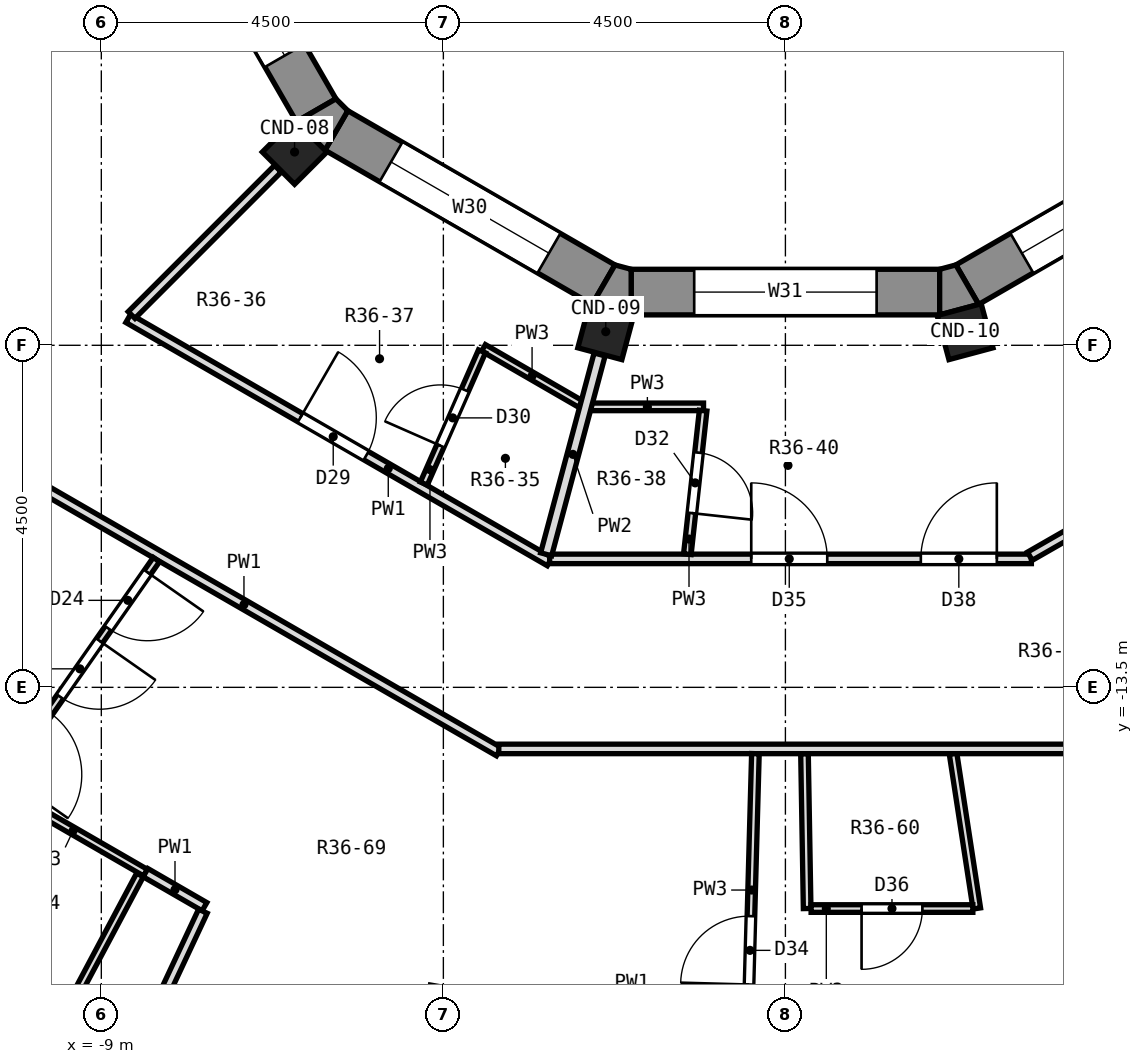
"""IFC4 building model, lengths in metres.
Left out: names, types, materials, properties, quantities, classifications, styles, units other than length and angle.
Written with IfcOpenShell. Run it as: python <this file> out.ifc"""

import sys

from ifc_helpers import new_model, si_unit, direction, frame, frame_2d, origin, origin_2d, place, context, subcontext, project, spatial, polyline, rectangle, outline, extrude, element, fill, save


model = new_model("IFC4")
c1 = context("Model", 3, precision=1e-05, world=origin(), true_north=direction((0.0, 1.0)))
c2 = subcontext(c1, "Body", "Model", "MODEL_VIEW")
j1 = project(units=[si_unit("LENGTHUNIT", "METRE"), si_unit("PLANEANGLEUNIT", "RADIAN")], contexts=[c1])
p1 = place(None, origin())
s1 = spatial("IfcSite", under=j1, at=p1, CompositionType="ELEMENT")
p2 = place(p1, origin())
s2 = spatial("IfcBuilding", under=s1, at=p2, CompositionType="ELEMENT")
p3 = place(p2, frame((0.0, 0.0, 259.4)))
s3 = spatial("IfcBuildingStorey", under=s2, at=p3, CompositionType="ELEMENT", Elevation=259.4)
for number, where, z_axis, x_axis in (
    (1, (-6.458, -6.458, 0.0), (0.0, 0.0, 1.0), (-0.707, -0.707, 0.0)),
    (2, (-2.364, -8.821, 0.0), (0.0, 0.0, 1.0), (-0.259, -0.966, 0.0)),
    (3, (2.364, -8.821, 0.0), (0.0, 0.0, 1.0), (0.259, -0.966, 0.0)),
):
    element("IfcColumn", number, at=place(p3, frame(where, z_axis=z_axis, x_axis=x_axis)), inside=s3, PredefinedType="COLUMN", context=c2, shape_type="SweptSolid", body=[
        extrude(rectangle(XDim=0.6, YDim=0.6, at=origin_2d()), origin(), (0.0, 0.0, 1.0), 3.3),
    ])
p4 = place(p3, frame((-8.203, -2.393, 0.0), z_axis=(0.0, 0.0, 1.0), x_axis=(0.499994954979, -0.866028316509, 0.0)))
e4 = element("IfcWall", 4, at=p4, inside=s3, PredefinedType="SOLIDWALL", context=c2, shape_type="SweptSolid", body=[
    extrude(rectangle(XDim=4.059, YDim=0.6, at=frame_2d((2.029, 0.0))), origin(), (0.0, 0.0, 1.0), 2.9),
])
p5 = place(p4, frame((0.829, 0.0, 0.9)))
e5 = element("IfcOpeningElement", 5, at=p5, cuts=e4, PredefinedType="OPENING", context=c2, shape_type="SweptSolid", body=[
    extrude(rectangle(XDim=2.4, YDim=1.8, at=frame_2d((1.2, 0.9))), frame((0.0, 0.312, 0.0), z_axis=(0.0, -1.0, 0.0), x_axis=(1.0, 0.0, 0.0)), (0.0, 0.0, 1.0), 0.624),
])
p6 = place(p3, frame((-5.907, -6.173, 0.0), z_axis=(0.0, 0.0, 1.0), x_axis=(0.866028316509, -0.499994954979, 0.0)))
e6 = element("IfcWall", 6, at=p6, inside=s3, PredefinedType="SOLIDWALL", context=c2, shape_type="SweptSolid", body=[
    extrude(rectangle(XDim=4.059, YDim=0.6, at=frame_2d((2.029, 0.0))), origin(), (0.0, 0.0, 1.0), 2.9),
])
p7 = place(p6, frame((0.829, 0.0, 0.9)))
e7 = element("IfcOpeningElement", 7, at=p7, cuts=e6, PredefinedType="OPENING", context=c2, shape_type="SweptSolid", body=[
    extrude(rectangle(XDim=2.4, YDim=1.8, at=frame_2d((1.2, 0.9))), frame((0.0, 0.312, 0.0), z_axis=(0.0, -1.0, 0.0), x_axis=(1.0, 0.0, 0.0)), (0.0, 0.0, 1.0), 0.624),
])
p8 = place(p3, frame((-2.029, -8.3, 0.0), z_axis=(0.0, 0.0, 1.0), x_axis=(1.0, 0.0, 0.0)))
e8 = element("IfcWall", 8, at=p8, inside=s3, PredefinedType="SOLIDWALL", context=c2, shape_type="SweptSolid", body=[
    extrude(rectangle(XDim=4.059, YDim=0.6, at=frame_2d((2.029, 0.0))), origin(), (0.0, 0.0, 1.0), 2.9),
])
p9 = place(p8, frame((0.829, 0.0, 0.9)))
e9 = element("IfcOpeningElement", 9, at=p9, cuts=e8, PredefinedType="OPENING", context=c2, shape_type="SweptSolid", body=[
    extrude(rectangle(XDim=2.4, YDim=1.8, at=frame_2d((1.2, 0.9))), frame((0.0, 0.312, 0.0), z_axis=(0.0, -1.0, 0.0), x_axis=(1.0, 0.0, 0.0)), (0.0, 0.0, 1.0), 0.624),
])
p10 = place(p3, frame((2.393, -8.203, 0.0), z_axis=(0.0, 0.0, 1.0), x_axis=(0.866028316509, 0.499994954979, 0.0)))
e10 = element("IfcWall", 10, at=p10, inside=s3, PredefinedType="SOLIDWALL", context=c2, shape_type="SweptSolid", body=[
    extrude(rectangle(XDim=4.059, YDim=0.6, at=frame_2d((2.029, 0.0))), origin(), (0.0, 0.0, 1.0), 2.9),
])
p11 = place(p10, frame((0.829, 0.0, 0.9)))
e11 = element("IfcOpeningElement", 11, at=p11, cuts=e10, PredefinedType="OPENING", context=c2, shape_type="SweptSolid", body=[
    extrude(rectangle(XDim=2.4, YDim=1.8, at=frame_2d((1.2, 0.9))), frame((0.0, 0.312, 0.0), z_axis=(0.0, -1.0, 0.0), x_axis=(1.0, 0.0, 0.0)), (0.0, 0.0, 1.0), 0.624),
])
p12 = place(p3, origin())
e12 = element("IfcWall", 12, at=p12, inside=s3, PredefinedType="SOLIDWALL", context=c2, shape_type="SweptSolid", body=[
    extrude(outline(polyline([(-6.058, -6.433), (-5.758, -5.914), (-5.914, -5.758), (-6.433, -6.058), (-6.058, -6.433)])), origin(), (0.0, 0.0, 1.0), 2.9),
])
p13 = place(p3, origin())
e13 = element("IfcWall", 13, at=p13, inside=s3, PredefinedType="SOLIDWALL", context=c2, shape_type="SweptSolid", body=[
    extrude(outline(polyline([(-2.029, -8.6), (-2.029, -8.0), (-2.242, -7.943), (-2.542, -8.462), (-2.029, -8.6)])), origin(), (0.0, 0.0, 1.0), 2.9),
])
p14 = place(p3, origin())
e14 = element("IfcWall", 14, at=p14, inside=s3, PredefinedType="SOLIDWALL", context=c2, shape_type="SweptSolid", body=[
    extrude(outline(polyline([(2.542, -8.462), (2.242, -7.943), (2.029, -8.0), (2.029, -8.6), (2.542, -8.462)])), origin(), (0.0, 0.0, 1.0), 2.9),
])
p15 = place(p3, frame((0.251, -14.373, 0.0), z_axis=(0.0, 0.0, 1.0), x_axis=(0.017133494207, -0.999853210915, 0.0)))
e15 = element("IfcWall", 15, at=p15, inside=s3, PredefinedType="PARTITIONING", context=c2, shape_type="SweptSolid", body=[
    extrude(rectangle(XDim=2.038, YDim=0.1, at=frame_2d((1.019, 0.0))), origin(), (0.0, 0.0, 1.0), 2.9),
])
p16 = place(p3, frame((2.206, -14.372, 0.0), z_axis=(0.0, 0.0, 1.0), x_axis=(0.151514148926, -0.988455088851, 0.0)))
e16 = element("IfcWall", 16, at=p16, inside=s3, PredefinedType="PARTITIONING", context=c2, shape_type="SweptSolid", body=[
    extrude(rectangle(XDim=2.061, YDim=0.1, at=frame_2d((1.03, 0.0))), origin(), (0.0, 0.0, 1.0), 2.9),
])
p17 = place(p3, frame((-11.639, -16.735, 0.0), z_axis=(0.0, 0.0, 1.0), x_axis=(0.866093196455, -0.499882561262, 0.0)))
e17 = element("IfcWall", 17, at=p17, inside=s3, PredefinedType="PARTITIONING", context=c2, shape_type="SweptSolid", body=[
    extrude(rectangle(XDim=2.42, YDim=0.1, at=frame_2d((1.21, 0.0))), origin(), (0.0, 0.0, 1.0), 2.9),
])
p18 = place(p17, frame((0.778, 0.0, 0.0)))
e18 = element("IfcOpeningElement", 18, at=p18, cuts=e17, PredefinedType="OPENING", context=c2, shape_type="SweptSolid", body=[
    extrude(rectangle(XDim=0.8, YDim=2.1, at=frame_2d((0.4, 1.05))), frame((0.0, 0.062, 0.0), z_axis=(0.0, -1.0, 0.0), x_axis=(1.0, 0.0, 0.0)), (0.0, 0.0, 1.0), 0.124),
])
p19 = place(p3, frame((-10.324, -14.838, 0.0), z_axis=(0.0, 0.0, 1.0), x_axis=(0.866035918664, -0.499981787252, 0.0)))
e19 = element("IfcWall", 19, at=p19, inside=s3, PredefinedType="PARTITIONING", context=c2, shape_type="SweptSolid", body=[
    extrude(rectangle(XDim=2.2, YDim=0.1, at=frame_2d((1.1, 0.0))), origin(), (0.0, 0.0, 1.0), 2.9),
])
p20 = place(p3, frame((-8.419, -15.938, 0.0), z_axis=(0.0, 0.0, 1.0), x_axis=(0.866053945006, -0.499950561895, 0.0)))
e20 = element("IfcWall", 20, at=p20, inside=s3, PredefinedType="PARTITIONING", context=c2, shape_type="SweptSolid", body=[
    extrude(rectangle(XDim=0.896, YDim=0.125, at=frame_2d((0.448, 0.0))), origin(), (0.0, 0.0, 1.0), 2.9),
])
p21 = place(p3, frame((-10.476, -10.476, 0.0), z_axis=(0.0, 0.0, 1.0), x_axis=(0.866073222863, -0.499917165778, 0.0)))
e21 = element("IfcWall", 21, at=p21, inside=s3, PredefinedType="PARTITIONING", context=c2, shape_type="SweptSolid", body=[
    extrude(rectangle(XDim=7.742, YDim=0.125, at=frame_2d((3.871, 0.0))), origin(), (0.0, 0.0, 1.0), 2.9),
])
p22 = place(p3, frame((-8.646, -8.646, 0.0), z_axis=(0.0, 0.0, 1.0), x_axis=(0.866085253322, -0.49989632323, 0.0)))
e22 = element("IfcWall", 22, at=p22, inside=s3, PredefinedType="PARTITIONING", context=c2, shape_type="SweptSolid", body=[
    extrude(rectangle(XDim=6.402, YDim=0.125, at=frame_2d((3.201, 0.0))), origin(), (0.0, 0.0, 1.0), 2.9),
])
p23 = place(p22, frame((2.614, 0.0, 0.0)))
e23 = element("IfcOpeningElement", 23, at=p23, cuts=e22, PredefinedType="OPENING", context=c2, shape_type="SweptSolid", body=[
    extrude(rectangle(XDim=1.0, YDim=2.1, at=frame_2d((0.5, 1.05))), frame((0.0, 0.074, 0.0), z_axis=(0.0, -1.0, 0.0), x_axis=(1.0, 0.0, 0.0)), (0.0, 0.0, 1.0), 0.149),
])
p24 = place(p3, frame((-3.972, -9.034, 0.0), z_axis=(0.0, 0.0, 1.0), x_axis=(0.865841190759, -0.500318930668, 0.0)))
e24 = element("IfcWall", 24, at=p24, inside=s3, PredefinedType="PARTITIONING", context=c2, shape_type="SweptSolid", body=[
    extrude(rectangle(XDim=1.476, YDim=0.1, at=frame_2d((0.738, 0.0))), origin(), (0.0, 0.0, 1.0), 2.9),
])
p25 = place(p3, frame((0.338, -16.41, 0.0), z_axis=(0.0, 0.0, 1.0), x_axis=(1.0, 0.0, 0.0)))
e25 = element("IfcWall", 25, at=p25, inside=s3, PredefinedType="PARTITIONING", context=c2, shape_type="SweptSolid", body=[
    extrude(rectangle(XDim=2.128, YDim=0.1, at=frame_2d((1.064, 0.0))), origin(), (0.0, 0.0, 1.0), 2.9),
])
p26 = place(p25, frame((0.664, 0.0, 0.0)))
e26 = element("IfcOpeningElement", 26, at=p26, cuts=e25, PredefinedType="OPENING", context=c2, shape_type="SweptSolid", body=[
    extrude(rectangle(XDim=0.8, YDim=2.1, at=frame_2d((0.4, 1.05))), frame((0.0, 0.062, 0.0), z_axis=(0.0, -1.0, 0.0), x_axis=(1.0, 0.0, 0.0)), (0.0, 0.0, 1.0), 0.124),
])
p27 = place(p3, frame((-3.771, -14.31, 0.0), z_axis=(0.0, 0.0, 1.0), x_axis=(1.0, 0.0, 0.0)))
e27 = element("IfcWall", 27, at=p27, inside=s3, PredefinedType="PARTITIONING", context=c2, shape_type="SweptSolid", body=[
    extrude(rectangle(XDim=7.677, YDim=0.125, at=frame_2d((3.838, 0.0))), origin(), (0.0, 0.0, 1.0), 2.9),
])
p28 = place(p3, frame((-3.102, -11.81, 0.0), z_axis=(0.0, 0.0, 1.0), x_axis=(1.0, 0.0, 0.0)))
e28 = element("IfcWall", 28, at=p28, inside=s3, PredefinedType="PARTITIONING", context=c2, shape_type="SweptSolid", body=[
    extrude(rectangle(XDim=6.338, YDim=0.125, at=frame_2d((3.169, 0.0))), origin(), (0.0, 0.0, 1.0), 2.9),
])
p29 = place(p28, frame((2.652, 0.0, 0.0)))
e29 = element("IfcOpeningElement", 29, at=p29, cuts=e28, PredefinedType="OPENING", context=c2, shape_type="SweptSolid", body=[
    extrude(rectangle(XDim=1.0, YDim=2.1, at=frame_2d((0.5, 1.05))), frame((0.0, 0.074, 0.0), z_axis=(0.0, -1.0, 0.0), x_axis=(1.0, 0.0, 0.0)), (0.0, 0.0, 1.0), 0.149),
])
p30 = place(p28, frame((4.883, 0.0, 0.0)))
e30 = element("IfcOpeningElement", 30, at=p30, cuts=e28, PredefinedType="OPENING", context=c2, shape_type="SweptSolid", body=[
    extrude(rectangle(XDim=1.0, YDim=2.1, at=frame_2d((0.5, 1.05))), frame((0.0, 0.074, 0.0), z_axis=(0.0, -1.0, 0.0), x_axis=(1.0, 0.0, 0.0)), (0.0, 0.0, 1.0), 0.149),
])
p31 = place(p3, frame((-2.554, -9.81, 0.0), z_axis=(0.0, 0.0, 1.0), x_axis=(1.0, 0.0, 0.0)))
e31 = element("IfcWall", 31, at=p31, inside=s3, PredefinedType="PARTITIONING", context=c2, shape_type="SweptSolid", body=[
    extrude(rectangle(XDim=1.477, YDim=0.1, at=frame_2d((0.739, 0.0))), origin(), (0.0, 0.0, 1.0), 2.9),
])
p32 = place(p3, frame((3.216, -11.775, 0.0), z_axis=(0.0, 0.0, 1.0), x_axis=(0.86736732566, 0.497668486422, 0.0)))
e32 = element("IfcWall", 32, at=p32, inside=s3, PredefinedType="PARTITIONING", context=c2, shape_type="SweptSolid", body=[
    extrude(rectangle(XDim=6.202, YDim=0.125, at=frame_2d((3.101, 0.0))), origin(), (0.0, 0.0, 1.0), 2.9),
])
p33 = place(p3, frame((-8.602, -8.602, 0.0), z_axis=(0.0, 0.0, 1.0), x_axis=(0.707106781187, 0.707106781187, 0.0)))
e33 = element("IfcWall", 33, at=p33, inside=s3, PredefinedType="PARTITIONING", context=c2, shape_type="SweptSolid", body=[
    extrude(rectangle(XDim=2.722, YDim=0.125, at=frame_2d((1.361, 0.0))), origin(), (0.0, 0.0, 1.0), 2.9),
])
p34 = place(p3, frame((-11.269, -16.094, 0.0), z_axis=(0.0, 0.0, 1.0), x_axis=(0.573597334784, 0.819137410651, 0.0)))
e34 = element("IfcWall", 34, at=p34, inside=s3, PredefinedType="PARTITIONING", context=c2, shape_type="SweptSolid", body=[
    extrude(rectangle(XDim=5.219, YDim=0.1, at=frame_2d((2.609, 0.0))), origin(), (0.0, 0.0, 1.0), 2.9),
])
p35 = place(p34, frame((4.114, 0.0, 0.0)))
e35 = element("IfcOpeningElement", 35, at=p35, cuts=e34, PredefinedType="OPENING", context=c2, shape_type="SweptSolid", body=[
    extrude(rectangle(XDim=0.9, YDim=2.1, at=frame_2d((0.45, 1.05))), frame((0.0, 0.062, 0.0), z_axis=(0.0, -1.0, 0.0), x_axis=(1.0, 0.0, 0.0)), (0.0, 0.0, 1.0), 0.124),
])
p36 = place(p34, frame((3.014, 0.0, 0.0)))
e36 = element("IfcOpeningElement", 36, at=p36, cuts=e34, PredefinedType="OPENING", context=c2, shape_type="SweptSolid", body=[
    extrude(rectangle(XDim=0.9, YDim=2.1, at=frame_2d((0.45, 1.05))), frame((0.0, 0.062, 0.0), z_axis=(0.0, -1.0, 0.0), x_axis=(1.0, 0.0, 0.0)), (0.0, 0.0, 1.0), 0.124),
])
p37 = place(p34, frame((1.764, 0.0, 0.0)))
e37 = element("IfcOpeningElement", 37, at=p37, cuts=e34, PredefinedType="OPENING", context=c2, shape_type="SweptSolid", body=[
    extrude(rectangle(XDim=1.0, YDim=2.1, at=frame_2d((0.5, 1.05))), frame((0.0, 0.062, 0.0), z_axis=(0.0, -1.0, 0.0), x_axis=(1.0, 0.0, 0.0)), (0.0, 0.0, 1.0), 0.124),
])
p38 = place(p3, frame((-9.52, -17.901, 0.0), z_axis=(0.0, 0.0, 1.0), x_axis=(0.469644416179, 0.882855663374, 0.0)))
e38 = element("IfcWall", 38, at=p38, inside=s3, PredefinedType="PARTITIONING", context=c2, shape_type="SweptSolid", body=[
    extrude(rectangle(XDim=2.189, YDim=0.1, at=frame_2d((1.094, 0.0))), origin(), (0.0, 0.0, 1.0), 2.9),
])
p39 = place(p3, frame((-9.22, -19.771, 0.0), z_axis=(0.0, 0.0, 1.0), x_axis=(0.4238971674, 0.90571032426, 0.0)))
e39 = element("IfcWall", 39, at=p39, inside=s3, PredefinedType="PARTITIONING", context=c2, shape_type="SweptSolid", body=[
    extrude(rectangle(XDim=3.672, YDim=0.125, at=frame_2d((1.836, 0.0))), origin(), (0.0, 0.0, 1.0), 2.9),
])
p40 = place(p3, frame((-4.757, -10.819, 0.0), z_axis=(0.0, 0.0, 1.0), x_axis=(0.402510340415, 0.915415438945, 0.0)))
e40 = element("IfcWall", 40, at=p40, inside=s3, PredefinedType="PARTITIONING", context=c2, shape_type="SweptSolid", body=[
    extrude(rectangle(XDim=1.9, YDim=0.1, at=frame_2d((0.95, 0.0))), origin(), (0.0, 0.0, 1.0), 2.9),
])
p41 = place(p40, frame((0.544, 0.0, 0.0)))
e41 = element("IfcOpeningElement", 41, at=p41, cuts=e40, PredefinedType="OPENING", context=c2, shape_type="SweptSolid", body=[
    extrude(rectangle(XDim=0.8, YDim=2.1, at=frame_2d((0.4, 1.05))), frame((0.0, 0.062, 0.0), z_axis=(0.0, -1.0, 0.0), x_axis=(1.0, 0.0, 0.0)), (0.0, 0.0, 1.0), 0.124),
])
p42 = place(p3, frame((-3.148, -11.75, 0.0), z_axis=(0.0, 0.0, 1.0), x_axis=(0.258438641581, 0.96602767483, 0.0)))
e42 = element("IfcWall", 42, at=p42, inside=s3, PredefinedType="PARTITIONING", context=c2, shape_type="SweptSolid", body=[
    extrude(rectangle(XDim=2.722, YDim=0.15, at=frame_2d((1.361, 0.0))), origin(), (0.0, 0.0, 1.0), 2.9),
])
p43 = place(p3, frame((-1.29, -11.748, 0.0), z_axis=(0.0, 0.0, 1.0), x_axis=(0.109373495701, 0.99400072356, 0.0)))
e43 = element("IfcWall", 43, at=p43, inside=s3, PredefinedType="PARTITIONING", context=c2, shape_type="SweptSolid", body=[
    extrude(rectangle(XDim=1.9, YDim=0.1, at=frame_2d((0.95, 0.0))), origin(), (0.0, 0.0, 1.0), 2.9),
])
p44 = place(p43, frame((0.543, 0.0, 0.0)))
e44 = element("IfcOpeningElement", 44, at=p44, cuts=e43, PredefinedType="OPENING", context=c2, shape_type="SweptSolid", body=[
    extrude(rectangle(XDim=0.8, YDim=2.1, at=frame_2d((0.4, 1.05))), frame((0.0, 0.062, 0.0), z_axis=(0.0, -1.0, 0.0), x_axis=(1.0, 0.0, 0.0)), (0.0, 0.0, 1.0), 0.124),
])
p45 = place(p3, frame((-0.494, -17.961, 0.0), z_axis=(0.0, 0.0, 1.0), x_axis=(0.027544314619, 0.999620583388, 0.0)))
e45 = element("IfcWall", 45, at=p45, inside=s3, PredefinedType="PARTITIONING", context=c2, shape_type="SweptSolid", body=[
    extrude(rectangle(XDim=3.59, YDim=0.1, at=frame_2d((1.795, 0.0))), origin(), (0.0, 0.0, 1.0), 2.9),
])
p46 = place(p45, frame((0.551, 0.0, 0.0)))
e46 = element("IfcOpeningElement", 46, at=p46, cuts=e45, PredefinedType="OPENING", context=c2, shape_type="SweptSolid", body=[
    extrude(rectangle(XDim=0.9, YDim=2.1, at=frame_2d((0.45, 1.05))), frame((0.0, 0.062, 0.0), z_axis=(0.0, -1.0, 0.0), x_axis=(1.0, 0.0, 0.0)), (0.0, 0.0, 1.0), 0.124),
])
p47 = place(p5, origin())
e47 = element("IfcWindow", 47, at=p47, inside=s3, PartitioningType="SINGLE_PANEL", PredefinedType="WINDOW", context=c2, shape_type="SweptSolid", body=[
    extrude(rectangle(XDim=2.4, YDim=1.8, at=frame_2d((1.2, 0.9))), frame((0.0, -0.12, 0.0), z_axis=(0.0, -1.0, 0.0), x_axis=(1.0, 0.0, 0.0)), (0.0, 0.0, 1.0), 0.06),
])
fill(e5, e47)
p48 = place(p7, origin())
e48 = element("IfcWindow", 48, at=p48, inside=s3, PartitioningType="SINGLE_PANEL", PredefinedType="WINDOW", context=c2, shape_type="SweptSolid", body=[
    extrude(rectangle(XDim=2.4, YDim=1.8, at=frame_2d((1.2, 0.9))), frame((0.0, -0.12, 0.0), z_axis=(0.0, -1.0, 0.0), x_axis=(1.0, 0.0, 0.0)), (0.0, 0.0, 1.0), 0.06),
])
fill(e7, e48)
p49 = place(p9, origin())
e49 = element("IfcWindow", 49, at=p49, inside=s3, PartitioningType="SINGLE_PANEL", PredefinedType="WINDOW", context=c2, shape_type="SweptSolid", body=[
    extrude(rectangle(XDim=2.4, YDim=1.8, at=frame_2d((1.2, 0.9))), frame((0.0, -0.12, 0.0), z_axis=(0.0, -1.0, 0.0), x_axis=(1.0, 0.0, 0.0)), (0.0, 0.0, 1.0), 0.06),
])
fill(e9, e49)
p50 = place(p11, origin())
e50 = element("IfcWindow", 50, at=p50, inside=s3, PartitioningType="SINGLE_PANEL", PredefinedType="WINDOW", context=c2, shape_type="SweptSolid", body=[
    extrude(rectangle(XDim=2.4, YDim=1.8, at=frame_2d((1.2, 0.9))), frame((0.0, -0.12, 0.0), z_axis=(0.0, -1.0, 0.0), x_axis=(1.0, 0.0, 0.0)), (0.0, 0.0, 1.0), 0.06),
])
fill(e11, e50)
p51 = place(p35, frame((0.9, 0.0, 0.0), z_axis=(0.0, 0.0, 1.0), x_axis=(-1.0, 0.0, 0.0)))
e51 = element("IfcDoor", 51, at=p51, inside=s3, OperationType="SINGLE_SWING_LEFT", PredefinedType="DOOR", context=c2, shape_type="SweptSolid", body=[
    extrude(rectangle(XDim=0.9, YDim=2.1, at=frame_2d((0.45, 1.05))), frame((0.0, 0.025, 0.0), z_axis=(0.0, -1.0, 0.0), x_axis=(1.0, 0.0, 0.0)), (0.0, 0.0, 1.0), 0.05),
])
fill(e35, e51)
p52 = place(p36, frame((0.9, 0.0, 0.0), z_axis=(0.0, 0.0, 1.0), x_axis=(-1.0, 0.0, 0.0)))
e52 = element("IfcDoor", 52, at=p52, inside=s3, OperationType="SINGLE_SWING_LEFT", PredefinedType="DOOR", context=c2, shape_type="SweptSolid", body=[
    extrude(rectangle(XDim=0.9, YDim=2.1, at=frame_2d((0.45, 1.05))), frame((0.0, 0.025, 0.0), z_axis=(0.0, -1.0, 0.0), x_axis=(1.0, 0.0, 0.0)), (0.0, 0.0, 1.0), 0.05),
])
fill(e36, e52)
p53 = place(p23, origin())
e53 = element("IfcDoor", 53, at=p53, inside=s3, OperationType="SINGLE_SWING_LEFT", PredefinedType="DOOR", context=c2, shape_type="SweptSolid", body=[
    extrude(rectangle(XDim=1.0, YDim=2.1, at=frame_2d((0.5, 1.05))), frame((0.0, 0.025, 0.0), z_axis=(0.0, -1.0, 0.0), x_axis=(1.0, 0.0, 0.0)), (0.0, 0.0, 1.0), 0.05),
])
fill(e23, e53)
p54 = place(p41, origin())
e54 = element("IfcDoor", 54, at=p54, inside=s3, OperationType="SINGLE_SWING_LEFT", PredefinedType="DOOR", context=c2, shape_type="SweptSolid", body=[
    extrude(rectangle(XDim=0.8, YDim=2.1, at=frame_2d((0.4, 1.05))), frame((0.0, 0.025, 0.0), z_axis=(0.0, -1.0, 0.0), x_axis=(1.0, 0.0, 0.0)), (0.0, 0.0, 1.0), 0.05),
])
fill(e41, e54)
p55 = place(p44, frame((0.8, 0.0, 0.0), z_axis=(0.0, 0.0, 1.0), x_axis=(-1.0, 0.0, 0.0)))
e55 = element("IfcDoor", 55, at=p55, inside=s3, OperationType="SINGLE_SWING_RIGHT", PredefinedType="DOOR", context=c2, shape_type="SweptSolid", body=[
    extrude(rectangle(XDim=0.8, YDim=2.1, at=frame_2d((0.4, 1.05))), frame((0.0, 0.025, 0.0), z_axis=(0.0, -1.0, 0.0), x_axis=(1.0, 0.0, 0.0)), (0.0, 0.0, 1.0), 0.05),
])
fill(e44, e55)
p56 = place(p46, origin())
e56 = element("IfcDoor", 56, at=p56, inside=s3, OperationType="SINGLE_SWING_LEFT", PredefinedType="DOOR", context=c2, shape_type="SweptSolid", body=[
    extrude(rectangle(XDim=0.9, YDim=2.1, at=frame_2d((0.45, 1.05))), frame((0.0, 0.025, 0.0), z_axis=(0.0, -1.0, 0.0), x_axis=(1.0, 0.0, 0.0)), (0.0, 0.0, 1.0), 0.05),
])
fill(e46, e56)
p57 = place(p29, origin())
e57 = element("IfcDoor", 57, at=p57, inside=s3, OperationType="SINGLE_SWING_LEFT", PredefinedType="DOOR", context=c2, shape_type="SweptSolid", body=[
    extrude(rectangle(XDim=1.0, YDim=2.1, at=frame_2d((0.5, 1.05))), frame((0.0, 0.025, 0.0), z_axis=(0.0, -1.0, 0.0), x_axis=(1.0, 0.0, 0.0)), (0.0, 0.0, 1.0), 0.05),
])
fill(e29, e57)
p58 = place(p26, frame((0.8, 0.0, 0.0), z_axis=(0.0, 0.0, 1.0), x_axis=(-1.0, 0.0, 0.0)))
e58 = element("IfcDoor", 58, at=p58, inside=s3, OperationType="SINGLE_SWING_RIGHT", PredefinedType="DOOR", context=c2, shape_type="SweptSolid", body=[
    extrude(rectangle(XDim=0.8, YDim=2.1, at=frame_2d((0.4, 1.05))), frame((0.0, 0.025, 0.0), z_axis=(0.0, -1.0, 0.0), x_axis=(1.0, 0.0, 0.0)), (0.0, 0.0, 1.0), 0.05),
])
fill(e26, e58)
p59 = place(p30, origin())
e59 = element("IfcDoor", 59, at=p59, inside=s3, OperationType="SINGLE_SWING_RIGHT", PredefinedType="DOOR", context=c2, shape_type="SweptSolid", body=[
    extrude(rectangle(XDim=1.0, YDim=2.1, at=frame_2d((0.5, 1.05))), frame((0.0, 0.025, 0.0), z_axis=(0.0, -1.0, 0.0), x_axis=(1.0, 0.0, 0.0)), (0.0, 0.0, 1.0), 0.05),
])
fill(e30, e59)
save(model, sys.argv[1])
